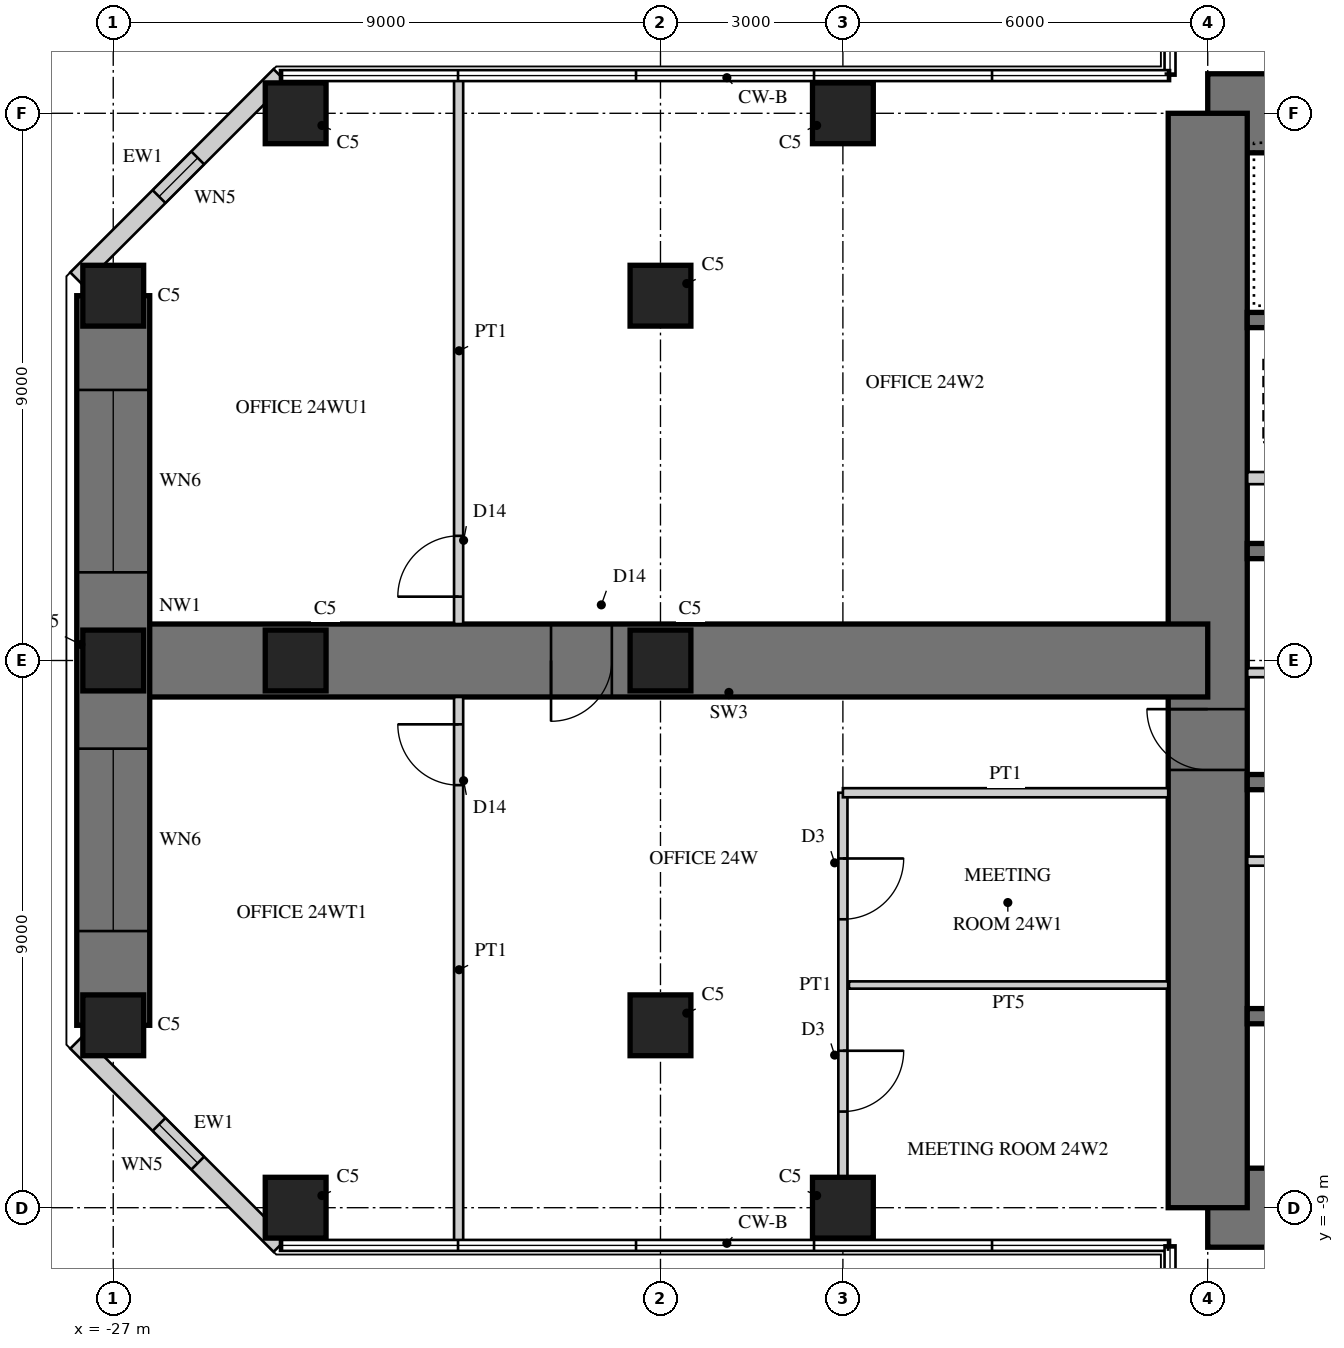
"""IFC4 building model, lengths in metres.
Left out: names, types, materials, properties, quantities, classifications, styles, units other than length and angle.
Written with IfcOpenShell. Run it as: python <this file> out.ifc"""

import sys

from ifc_helpers import new_model, si_unit, direction, frame, frame_2d, origin, origin_2d, place, context, subcontext, project, spatial, rectangle, hollow_rectangle, extrude, element, fill, save


model = new_model("IFC4")
c1 = context("Model", 3, precision=1e-05, world=origin(), true_north=direction((0.0, 1.0)))
c2 = subcontext(c1, "Body", "Model", "MODEL_VIEW")
j1 = project(units=[si_unit("LENGTHUNIT", "METRE"), si_unit("PLANEANGLEUNIT", "RADIAN")], contexts=[c1])
p1 = place(None, origin())
s1 = spatial("IfcSite", under=j1, at=p1, CompositionType="ELEMENT")
p2 = place(p1, origin())
s2 = spatial("IfcBuilding", under=s1, at=p2, CompositionType="ELEMENT")
p3 = place(p2, frame((0.0, 0.0, 100.5)))
s3 = spatial("IfcBuildingStorey", under=s2, at=p3, CompositionType="ELEMENT", Elevation=100.5)
p4 = place(p3, frame((9.0, 9.0, 0.0), z_axis=(0.0, 0.0, 1.0), x_axis=(-1.0, 0.0, 0.0)))
e1 = element("IfcWall", 1, at=p4, inside=s3, PredefinedType="SHEAR", context=c2, shape_type="SweptSolid", body=[
    extrude(rectangle(XDim=18.0, YDim=1.3, at=frame_2d((9.0, 0.0))), origin(), (0.0, 0.0, 1.0), 4.0),
])
p5 = place(p4, frame((9.8, 0.0, 0.0)))
e2 = element("IfcOpeningElement", 2, at=p5, cuts=e1, PredefinedType="OPENING", context=c2, shape_type="SweptSolid", body=[
    extrude(rectangle(XDim=1.0, YDim=2.4, at=frame_2d((0.5, 1.2))), frame((0.0, 0.66, 0.0), z_axis=(0.0, -1.0, 0.0), x_axis=(1.0, 0.0, 0.0)), (0.0, 0.0, 1.0), 1.32),
])
p6 = place(p3, frame((-9.0, -9.0, 0.0), z_axis=(0.0, 0.0, 1.0), x_axis=(1.0, 0.0, 0.0)))
e3 = element("IfcWall", 3, at=p6, inside=s3, PredefinedType="SHEAR", context=c2, shape_type="SweptSolid", body=[
    extrude(rectangle(XDim=18.0, YDim=1.3, at=frame_2d((9.0, 0.0))), origin(), (0.0, 0.0, 1.0), 4.0),
])
p7 = place(p6, frame((9.8, 0.0, 0.0)))
e4 = element("IfcOpeningElement", 4, at=p7, cuts=e3, PredefinedType="OPENING", context=c2, shape_type="SweptSolid", body=[
    extrude(rectangle(XDim=1.0, YDim=2.4, at=frame_2d((0.5, 1.2))), frame((0.0, 0.66, 0.0), z_axis=(0.0, -1.0, 0.0), x_axis=(1.0, 0.0, 0.0)), (0.0, 0.0, 1.0), 1.32),
])
p8 = place(p3, frame((-9.0, 9.0, 0.0), z_axis=(0.0, 0.0, 1.0), x_axis=(0.0, -1.0, 0.0)))
e5 = element("IfcWall", 5, at=p8, inside=s3, PredefinedType="SHEAR", context=c2, shape_type="SweptSolid", body=[
    extrude(rectangle(XDim=18.0, YDim=1.3, at=frame_2d((9.0, 0.0))), origin(), (0.0, 0.0, 1.0), 4.0),
])
p9 = place(p8, frame((9.8, 0.0, 0.0)))
e6 = element("IfcOpeningElement", 6, at=p9, cuts=e5, PredefinedType="OPENING", context=c2, shape_type="SweptSolid", body=[
    extrude(rectangle(XDim=1.0, YDim=2.4, at=frame_2d((0.5, 1.2))), frame((0.0, 0.66, 0.0), z_axis=(0.0, -1.0, 0.0), x_axis=(1.0, 0.0, 0.0)), (0.0, 0.0, 1.0), 1.32),
])
p10 = place(p3, frame((-2.125, 1.8, 0.0), z_axis=(0.0, 0.0, 1.0), x_axis=(-1.0, 0.0, 0.0)))
e7 = element("IfcWall", 7, at=p10, inside=s3, PredefinedType="SHEAR", context=c2, shape_type="SweptSolid", body=[
    extrude(rectangle(XDim=6.225, YDim=0.25, at=frame_2d((3.113, 0.0))), origin(), (0.0, 0.0, 1.0), 4.0),
])
p11 = place(p3, frame((-2.125, 5.6, 0.0), z_axis=(0.0, 0.0, 1.0), x_axis=(-1.0, 0.0, 0.0)))
e8 = element("IfcWall", 8, at=p11, inside=s3, PredefinedType="SHEAR", context=c2, shape_type="SweptSolid", body=[
    extrude(rectangle(XDim=6.225, YDim=0.25, at=frame_2d((3.113, 0.0))), origin(), (0.0, 0.0, 1.0), 4.0),
])
p12 = place(p11, frame((0.175, 0.0, 0.0)))
e9 = element("IfcOpeningElement", 9, at=p12, cuts=e8, PredefinedType="OPENING", context=c2, shape_type="SweptSolid", body=[
    extrude(rectangle(XDim=1.0, YDim=2.1, at=frame_2d((0.5, 1.05))), frame((0.0, 0.135, 0.0), z_axis=(0.0, -1.0, 0.0), x_axis=(1.0, 0.0, 0.0)), (0.0, 0.0, 1.0), 0.27),
])
p13 = place(p3, frame((-5.725, 3.0, 0.0), z_axis=(0.0, 0.0, 1.0), x_axis=(-1.0, 0.0, 0.0)))
e10 = element("IfcWall", 10, at=p13, inside=s3, PredefinedType="PARTITIONING", context=c2, shape_type="SweptSolid", body=[
    extrude(rectangle(XDim=2.625, YDim=0.2, at=frame_2d((1.312, 0.0))), origin(), (0.0, 0.0, 1.0), 4.0),
])
for number, where, z_axis, x_axis in (
    (11, (-1.925, -2.0, 0.0), (0.0, 0.0, 1.0), (-1.0, 0.0, 0.0)),
    (12, (-1.925, -5.85, 0.0), (0.0, 0.0, 1.0), (-1.0, 0.0, 0.0)),
):
    element("IfcWall", number, at=place(p3, frame(where, z_axis=z_axis, x_axis=x_axis)), inside=s3, PredefinedType="SHEAR", context=c2, shape_type="SweptSolid", body=[
        extrude(rectangle(XDim=6.425, YDim=0.25, at=frame_2d((3.212, 0.0))), origin(), (0.0, 0.0, 1.0), 4.0),
    ])
p14 = place(p3, frame((-1.925, -3.3, 0.0), z_axis=(0.0, 0.0, 1.0), x_axis=(-1.0, 0.0, 0.0)))
e13 = element("IfcWall", 13, at=p14, inside=s3, PredefinedType="PARTITIONING", context=c2, shape_type="SweptSolid", body=[
    extrude(rectangle(XDim=6.425, YDim=0.15, at=frame_2d((3.212, 0.0))), origin(), (0.0, 0.0, 1.0), 4.0),
])
p15 = place(p14, frame((0.075, 0.0, 0.0)))
e14 = element("IfcOpeningElement", 14, at=p15, cuts=e13, PredefinedType="OPENING", context=c2, shape_type="SweptSolid", body=[
    extrude(rectangle(XDim=0.8, YDim=2.1, at=frame_2d((0.4, 1.05))), frame((0.0, 0.085, 0.0), z_axis=(0.0, -1.0, 0.0), x_axis=(1.0, 0.0, 0.0)), (0.0, 0.0, 1.0), 0.17),
])
p16 = place(p14, frame((3.675, 0.0, 0.0)))
e15 = element("IfcOpeningElement", 15, at=p16, cuts=e13, PredefinedType="OPENING", context=c2, shape_type="SweptSolid", body=[
    extrude(rectangle(XDim=0.8, YDim=2.1, at=frame_2d((0.4, 1.05))), frame((0.0, 0.085, 0.0), z_axis=(0.0, -1.0, 0.0), x_axis=(1.0, 0.0, 0.0)), (0.0, 0.0, 1.0), 0.17),
])
p17 = place(p3, frame((-9.0, 0.0, 0.0), z_axis=(0.0, 0.0, 1.0), x_axis=(-1.0, 0.0, 0.0)))
e16 = element("IfcWall", 16, at=p17, inside=s3, PredefinedType="SHEAR", context=c2, shape_type="SweptSolid", body=[
    extrude(rectangle(XDim=18.0, YDim=1.2, at=frame_2d((9.0, 0.0))), origin(), (0.0, 0.0, 1.0), 4.0),
])
p18 = place(p17, frame((9.8, 0.0, 0.0)))
e17 = element("IfcOpeningElement", 17, at=p18, cuts=e16, PredefinedType="OPENING", context=c2, shape_type="SweptSolid", body=[
    extrude(rectangle(XDim=1.0, YDim=2.2, at=frame_2d((0.5, 1.1))), frame((0.0, 0.61, 0.0), z_axis=(0.0, -1.0, 0.0), x_axis=(1.0, 0.0, 0.0)), (0.0, 0.0, 1.0), 1.22),
])
p19 = place(p3, frame((-27.0, 6.0, 0.0), z_axis=(0.0, 0.0, 1.0), x_axis=(0.0, -1.0, 0.0)))
e18 = element("IfcWall", 18, at=p19, inside=s3, PredefinedType="SHEAR", context=c2, shape_type="SweptSolid", body=[
    extrude(rectangle(XDim=12.0, YDim=1.2, at=frame_2d((6.0, 0.0))), origin(), (0.0, 0.0, 1.0), 4.0),
])
p20 = place(p19, frame((1.55, 0.0, 0.6)))
e19 = element("IfcOpeningElement", 19, at=p20, cuts=e18, PredefinedType="OPENING", context=c2, shape_type="SweptSolid", body=[
    extrude(rectangle(XDim=3.0, YDim=2.4, at=frame_2d((1.5, 1.2))), frame((0.0, 0.61, 0.0), z_axis=(0.0, -1.0, 0.0), x_axis=(1.0, 0.0, 0.0)), (0.0, 0.0, 1.0), 1.22),
])
p21 = place(p19, frame((7.45, 0.0, 0.6)))
e20 = element("IfcOpeningElement", 20, at=p21, cuts=e18, PredefinedType="OPENING", context=c2, shape_type="SweptSolid", body=[
    extrude(rectangle(XDim=3.0, YDim=2.4, at=frame_2d((1.5, 1.2))), frame((0.0, 0.61, 0.0), z_axis=(0.0, -1.0, 0.0), x_axis=(1.0, 0.0, 0.0)), (0.0, 0.0, 1.0), 1.22),
])
for number, where, z_axis, x_axis in (
    (21, (-15.0, 9.0, 0.0), (0.0, 0.0, 1.0), (1.0, 0.0, 0.0)),
    (22, (-24.0, 9.0, 0.0), (0.0, 0.0, 1.0), (1.0, 0.0, 0.0)),
    (23, (-15.0, -9.0, 0.0), (0.0, 0.0, 1.0), (1.0, 0.0, 0.0)),
    (24, (-24.0, -9.0, 0.0), (0.0, 0.0, 1.0), (1.0, 0.0, 0.0)),
    (25, (-27.0, 6.0, 0.0), (0.0, 0.0, 1.0), (1.0, 0.0, 0.0)),
    (26, (-27.0, 0.0, 0.0), (0.0, 0.0, 1.0), (1.0, 0.0, 0.0)),
    (27, (-27.0, -6.0, 0.0), (0.0, 0.0, 1.0), (1.0, 0.0, 0.0)),
    (28, (-18.0, 6.0, 0.0), (0.0, 0.0, 1.0), (1.0, 0.0, 0.0)),
    (29, (-18.0, 0.0, 0.0), (0.0, 0.0, 1.0), (1.0, 0.0, 0.0)),
    (30, (-18.0, -6.0, 0.0), (0.0, 0.0, 1.0), (1.0, 0.0, 0.0)),
    (31, (-24.0, 0.0, 0.0), (0.0, 0.0, 1.0), (1.0, 0.0, 0.0)),
):
    element("IfcColumn", number, at=place(p3, frame(where, z_axis=z_axis, x_axis=x_axis)), inside=s3, PredefinedType="COLUMN", context=c2, shape_type="SweptSolid", body=[
        extrude(rectangle(XDim=1.0, YDim=1.0, at=origin_2d()), origin(), (0.0, 0.0, 1.0), 4.0),
    ])
p22 = place(p3, frame((-24.257, 9.62, 0.0), z_axis=(0.0, 0.0, 1.0), x_axis=(-0.707106781187, -0.707106781187, 0.0)))
e32 = element("IfcWall", 32, at=p22, inside=s3, PredefinedType="SOLIDWALL", context=c2, shape_type="SweptSolid", body=[
    extrude(rectangle(XDim=4.728, YDim=0.3, at=frame_2d((2.364, 0.0))), origin(), (0.0, 0.0, 1.0), 3.8),
])
p23 = place(p22, frame((1.914, 0.0, 0.3)))
e33 = element("IfcOpeningElement", 33, at=p23, cuts=e32, PredefinedType="OPENING", context=c2, shape_type="SweptSolid", body=[
    extrude(rectangle(XDim=0.9, YDim=2.4, at=frame_2d((0.45, 1.2))), frame((0.0, 0.16, 0.0), z_axis=(0.0, -1.0, 0.0), x_axis=(1.0, 0.0, 0.0)), (0.0, 0.0, 1.0), 0.32),
])
p24 = place(p3, frame((-27.6, -6.277, 0.0), z_axis=(0.0, 0.0, 1.0), x_axis=(0.707106781187, -0.707106781187, 0.0)))
e34 = element("IfcWall", 34, at=p24, inside=s3, PredefinedType="SOLIDWALL", context=c2, shape_type="SweptSolid", body=[
    extrude(rectangle(XDim=4.728, YDim=0.3, at=frame_2d((2.364, 0.0))), origin(), (0.0, 0.0, 1.0), 3.8),
])
p25 = place(p24, frame((1.914, 0.0, 0.3)))
e35 = element("IfcOpeningElement", 35, at=p25, cuts=e34, PredefinedType="OPENING", context=c2, shape_type="SweptSolid", body=[
    extrude(rectangle(XDim=0.9, YDim=2.4, at=frame_2d((0.45, 1.2))), frame((0.0, 0.16, 0.0), z_axis=(0.0, -1.0, 0.0), x_axis=(1.0, 0.0, 0.0)), (0.0, 0.0, 1.0), 0.32),
])
p26 = place(p3, frame((-2.325, -0.2, 0.0), z_axis=(0.0, 0.0, 1.0), x_axis=(-1.0, 0.0, 0.0)))
e36 = element("IfcWall", 36, at=p26, inside=s3, PredefinedType="PARTITIONING", context=c2, shape_type="SweptSolid", body=[
    extrude(rectangle(XDim=6.025, YDim=0.15, at=frame_2d((3.013, 0.0))), origin(), (0.0, 0.0, 1.0), 3.8),
])
p27 = place(p26, frame((0.4, 0.0, 0.0)))
e37 = element("IfcOpeningElement", 37, at=p27, cuts=e36, PredefinedType="OPENING", context=c2, shape_type="SweptSolid", body=[
    extrude(rectangle(XDim=1.0, YDim=2.1, at=frame_2d((0.5, 1.05))), frame((0.0, 0.085, 0.0), z_axis=(0.0, -1.0, 0.0), x_axis=(1.0, 0.0, 0.0)), (0.0, 0.0, 1.0), 0.17),
])
p28 = place(p3, frame((-15.0, -2.175, 0.0), z_axis=(0.0, 0.0, 1.0), x_axis=(0.0, -1.0, 0.0)))
e38 = element("IfcWall", 38, at=p28, inside=s3, PredefinedType="PARTITIONING", context=c2, shape_type="SweptSolid", body=[
    extrude(rectangle(XDim=6.325, YDim=0.15, at=frame_2d((3.163, 0.0))), origin(), (0.0, 0.0, 1.0), 3.0),
])
p29 = place(p28, frame((1.081, 0.0, 0.0)))
e39 = element("IfcOpeningElement", 39, at=p29, cuts=e38, PredefinedType="OPENING", context=c2, shape_type="SweptSolid", body=[
    extrude(rectangle(XDim=1.0, YDim=2.1, at=frame_2d((0.5, 1.05))), frame((0.0, 0.085, 0.0), z_axis=(0.0, -1.0, 0.0), x_axis=(1.0, 0.0, 0.0)), (0.0, 0.0, 1.0), 0.17),
])
p30 = place(p28, frame((4.244, 0.0, 0.0)))
e40 = element("IfcOpeningElement", 40, at=p30, cuts=e38, PredefinedType="OPENING", context=c2, shape_type="SweptSolid", body=[
    extrude(rectangle(XDim=1.0, YDim=2.1, at=frame_2d((0.5, 1.05))), frame((0.0, 0.085, 0.0), z_axis=(0.0, -1.0, 0.0), x_axis=(1.0, 0.0, 0.0)), (0.0, 0.0, 1.0), 0.17),
])
p31 = place(p3, frame((-9.65, -2.175, 0.0), z_axis=(0.0, 0.0, 1.0), x_axis=(-1.0, 0.0, 0.0)))
e41 = element("IfcWall", 41, at=p31, inside=s3, PredefinedType="PARTITIONING", context=c2, shape_type="SweptSolid", body=[
    extrude(rectangle(XDim=5.35, YDim=0.15, at=frame_2d((2.675, 0.0))), origin(), (0.0, 0.0, 1.0), 3.8),
])
p32 = place(p3, frame((-9.65, -5.337, 0.0), z_axis=(0.0, 0.0, 1.0), x_axis=(-1.0, 0.0, 0.0)))
e42 = element("IfcWall", 42, at=p32, inside=s3, PredefinedType="PLUMBINGWALL", context=c2, shape_type="SweptSolid", body=[
    extrude(rectangle(XDim=5.25, YDim=0.12, at=frame_2d((2.625, 0.0))), origin(), (0.0, 0.0, 1.0), 3.8),
])
p33 = place(p3, frame((-21.32, -0.6, 0.0), z_axis=(0.0, 0.0, 1.0), x_axis=(0.0, -1.0, 0.0)))
e43 = element("IfcWall", 43, at=p33, inside=s3, PredefinedType="PARTITIONING", context=c2, shape_type="SweptSolid", body=[
    extrude(rectangle(XDim=8.98, YDim=0.15, at=frame_2d((4.49, 0.0))), origin(), (0.0, 0.0, 1.0), 3.8),
])
p34 = place(p33, frame((0.45, 0.0, 0.0)))
e44 = element("IfcOpeningElement", 44, at=p34, cuts=e43, PredefinedType="OPENING", context=c2, shape_type="SweptSolid", body=[
    extrude(rectangle(XDim=1.0, YDim=2.2, at=frame_2d((0.5, 1.1))), frame((0.0, 0.085, 0.0), z_axis=(0.0, -1.0, 0.0), x_axis=(1.0, 0.0, 0.0)), (0.0, 0.0, 1.0), 0.17),
])
p35 = place(p3, frame((-21.32, 9.58, 0.0), z_axis=(0.0, 0.0, 1.0), x_axis=(0.0, -1.0, 0.0)))
e45 = element("IfcWall", 45, at=p35, inside=s3, PredefinedType="PARTITIONING", context=c2, shape_type="SweptSolid", body=[
    extrude(rectangle(XDim=8.98, YDim=0.15, at=frame_2d((4.49, 0.0))), origin(), (0.0, 0.0, 1.0), 3.8),
])
p36 = place(p35, frame((7.53, 0.0, 0.0)))
e46 = element("IfcOpeningElement", 46, at=p36, cuts=e45, PredefinedType="OPENING", context=c2, shape_type="SweptSolid", body=[
    extrude(rectangle(XDim=1.0, YDim=2.2, at=frame_2d((0.5, 1.1))), frame((0.0, 0.085, 0.0), z_axis=(0.0, -1.0, 0.0), x_axis=(1.0, 0.0, 0.0)), (0.0, 0.0, 1.0), 0.17),
])
p37 = place(p23, origin())
e47 = element("IfcWindow", 47, at=p37, inside=s3, PartitioningType="SINGLE_PANEL", PredefinedType="WINDOW", context=c2, shape_type="SweptSolid", body=[
    extrude(hollow_rectangle(XDim=0.9, YDim=2.4, WallThickness=0.06, at=frame_2d((0.45, 1.2))), frame((0.0, 0.03, 0.0), z_axis=(0.0, -1.0, 0.0), x_axis=(1.0, 0.0, 0.0)), (0.0, 0.0, 1.0), 0.06),
    extrude(rectangle(XDim=0.779, YDim=2.279, at=frame_2d((0.45, 1.2))), frame((0.0, 0.03, 0.0), z_axis=(0.0, -1.0, 0.0), x_axis=(1.0, 0.0, 0.0)), (0.0, 0.0, 1.0), 0.06),
])
fill(e33, e47)
p38 = place(p20, origin())
e48 = element("IfcWindow", 48, at=p38, inside=s3, PartitioningType="SINGLE_PANEL", PredefinedType="WINDOW", context=c2, shape_type="SweptSolid", body=[
    extrude(hollow_rectangle(XDim=3.0, YDim=2.4, WallThickness=0.06, at=frame_2d((1.5, 1.2))), frame((0.0, 0.03, 0.0), z_axis=(0.0, -1.0, 0.0), x_axis=(1.0, 0.0, 0.0)), (0.0, 0.0, 1.0), 0.06),
    extrude(rectangle(XDim=2.879, YDim=2.279, at=frame_2d((1.5, 1.2))), frame((0.0, 0.03, 0.0), z_axis=(0.0, -1.0, 0.0), x_axis=(1.0, 0.0, 0.0)), (0.0, 0.0, 1.0), 0.06),
])
fill(e19, e48)
p39 = place(p21, origin())
e49 = element("IfcWindow", 49, at=p39, inside=s3, PartitioningType="SINGLE_PANEL", PredefinedType="WINDOW", context=c2, shape_type="SweptSolid", body=[
    extrude(hollow_rectangle(XDim=3.0, YDim=2.4, WallThickness=0.06, at=frame_2d((1.5, 1.2))), frame((0.0, 0.03, 0.0), z_axis=(0.0, -1.0, 0.0), x_axis=(1.0, 0.0, 0.0)), (0.0, 0.0, 1.0), 0.06),
    extrude(rectangle(XDim=2.879, YDim=2.279, at=frame_2d((1.5, 1.2))), frame((0.0, 0.03, 0.0), z_axis=(0.0, -1.0, 0.0), x_axis=(1.0, 0.0, 0.0)), (0.0, 0.0, 1.0), 0.06),
])
fill(e20, e49)
p40 = place(p25, origin())
e50 = element("IfcWindow", 50, at=p40, inside=s3, PartitioningType="SINGLE_PANEL", PredefinedType="WINDOW", context=c2, shape_type="SweptSolid", body=[
    extrude(hollow_rectangle(XDim=0.9, YDim=2.4, WallThickness=0.06, at=frame_2d((0.45, 1.2))), frame((0.0, 0.03, 0.0), z_axis=(0.0, -1.0, 0.0), x_axis=(1.0, 0.0, 0.0)), (0.0, 0.0, 1.0), 0.06),
    extrude(rectangle(XDim=0.779, YDim=2.279, at=frame_2d((0.45, 1.2))), frame((0.0, 0.03, 0.0), z_axis=(0.0, -1.0, 0.0), x_axis=(1.0, 0.0, 0.0)), (0.0, 0.0, 1.0), 0.06),
])
fill(e35, e50)
p41 = place(p29, origin())
e51 = element("IfcDoor", 51, at=p41, inside=s3, OperationType="SINGLE_SWING_LEFT", PredefinedType="DOOR", context=c2, shape_type="SweptSolid", body=[
    extrude(rectangle(XDim=1.0, YDim=2.1, at=frame_2d((0.5, 1.05))), frame((0.0, 0.025, 0.0), z_axis=(0.0, -1.0, 0.0), x_axis=(1.0, 0.0, 0.0)), (0.0, 0.0, 1.0), 0.05),
])
fill(e39, e51)
p42 = place(p30, origin())
e52 = element("IfcDoor", 52, at=p42, inside=s3, OperationType="SINGLE_SWING_LEFT", PredefinedType="DOOR", context=c2, shape_type="SweptSolid", body=[
    extrude(rectangle(XDim=1.0, YDim=2.1, at=frame_2d((0.5, 1.05))), frame((0.0, 0.025, 0.0), z_axis=(0.0, -1.0, 0.0), x_axis=(1.0, 0.0, 0.0)), (0.0, 0.0, 1.0), 0.05),
])
fill(e40, e52)
p43 = place(p34, frame((1.0, 0.0, 0.0), z_axis=(0.0, 0.0, 1.0), x_axis=(-1.0, 0.0, 0.0)))
e53 = element("IfcDoor", 53, at=p43, inside=s3, OperationType="SINGLE_SWING_RIGHT", PredefinedType="DOOR", context=c2, shape_type="SweptSolid", body=[
    extrude(rectangle(XDim=1.0, YDim=2.2, at=frame_2d((0.5, 1.1))), frame((0.0, 0.025, 0.0), z_axis=(0.0, -1.0, 0.0), x_axis=(1.0, 0.0, 0.0)), (0.0, 0.0, 1.0), 0.05),
])
fill(e44, e53)
p44 = place(p36, frame((1.0, 0.0, 0.0), z_axis=(0.0, 0.0, 1.0), x_axis=(-1.0, 0.0, 0.0)))
e54 = element("IfcDoor", 54, at=p44, inside=s3, OperationType="SINGLE_SWING_LEFT", PredefinedType="DOOR", context=c2, shape_type="SweptSolid", body=[
    extrude(rectangle(XDim=1.0, YDim=2.2, at=frame_2d((0.5, 1.1))), frame((0.0, 0.025, 0.0), z_axis=(0.0, -1.0, 0.0), x_axis=(1.0, 0.0, 0.0)), (0.0, 0.0, 1.0), 0.05),
])
fill(e46, e54)
p45 = place(p18, origin())
e55 = element("IfcDoor", 55, at=p45, inside=s3, OperationType="SINGLE_SWING_RIGHT", PredefinedType="DOOR", context=c2, shape_type="SweptSolid", body=[
    extrude(rectangle(XDim=1.0, YDim=2.2, at=frame_2d((0.5, 1.1))), frame((0.0, 0.025, 0.0), z_axis=(0.0, -1.0, 0.0), x_axis=(1.0, 0.0, 0.0)), (0.0, 0.0, 1.0), 0.05),
])
fill(e17, e55)
p46 = place(p9, frame((1.0, 0.0, 0.0), z_axis=(0.0, 0.0, 1.0), x_axis=(-1.0, 0.0, 0.0)))
e56 = element("IfcDoor", 56, at=p46, inside=s3, OperationType="SINGLE_SWING_RIGHT", PredefinedType="DOOR", context=c2, shape_type="SweptSolid", body=[
    extrude(rectangle(XDim=1.0, YDim=2.4, at=frame_2d((0.5, 1.2))), frame((0.0, -0.005, 0.0), z_axis=(0.0, -1.0, 0.0), x_axis=(1.0, 0.0, 0.0)), (0.0, 0.0, 1.0), 0.05),
])
fill(e6, e56)
save(model, sys.argv[1])
